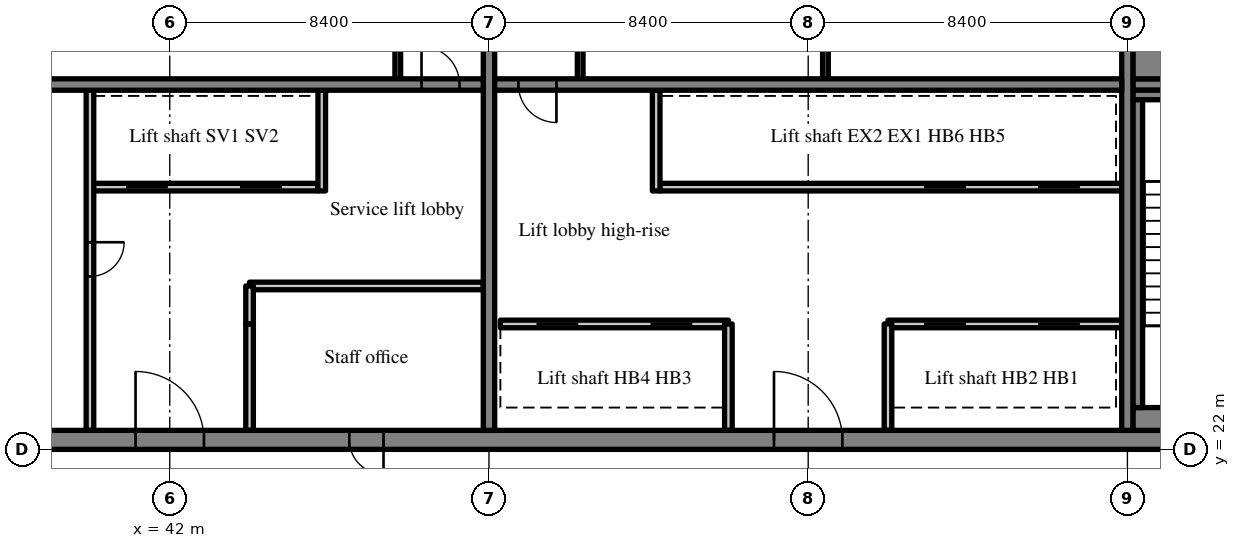
"""IFC4 building model, lengths in metres.
Left out: names, types, materials, properties, quantities, classifications, styles, units other than length and angle.
Written with IfcOpenShell. Run it as: python <this file> out.ifc"""

import sys

from ifc_helpers import new_model, si_unit, direction, frame, frame_2d, origin, place, context, subcontext, project, spatial, rectangle, extrude, source, transform, mapped, element, fill, save


model = new_model("IFC4")
c1 = context("Model", 3, precision=1e-05, world=origin(), true_north=direction((0.0, 1.0)))
c2 = subcontext(c1, "Body", "Model", "MODEL_VIEW")
j1 = project(units=[si_unit("LENGTHUNIT", "METRE"), si_unit("PLANEANGLEUNIT", "RADIAN")], contexts=[c1])
p1 = place(None, origin())
s1 = spatial("IfcSite", under=j1, at=p1, CompositionType="ELEMENT")
p2 = place(p1, origin())
s2 = spatial("IfcBuilding", under=s1, at=p2, CompositionType="ELEMENT")
p3 = place(p2, frame((0.0, 0.0, 281.7)))
s3 = spatial("IfcBuildingStorey", under=s2, at=p3, CompositionType="ELEMENT", Elevation=281.7)
m1 = source(origin(), c2, "Body", "SweptSolid", [
    extrude(rectangle(XDim=50.4, YDim=0.5, at=frame_2d((25.2, 0.0))), origin(), (0.0, 0.0, 1.0), 3.72),
])
p4 = place(p3, frame((25.2, 22.25, 0.0), z_axis=(0.0, 0.0, 1.0), x_axis=(1.0, 0.0, 0.0)))
e1 = element("IfcWall", 1, at=p4, inside=s3, PredefinedType="SHEAR", context=c2, shape_type="MappedRepresentation", body=[
    mapped(m1, transform((0.0, 0.0, 0.0), scale=1.0)),
])
m2 = source(origin(), c2, "Body", "SweptSolid", [
    extrude(rectangle(XDim=1.8, YDim=2.1, at=frame_2d((0.9, 1.05))), frame((0.0, 0.26, 0.0), z_axis=(0.0, -1.0, 0.0), x_axis=(1.0, 0.0, 0.0)), (0.0, 0.0, 1.0), 0.52),
])
p5 = place(p4, frame((15.9, 0.0, 0.0)))
e2 = element("IfcOpeningElement", 2, at=p5, cuts=e1, PredefinedType="OPENING", context=c2, shape_type="MappedRepresentation", body=[
    mapped(m2, transform((0.0, 0.0, 0.0), scale=1.0)),
])
m3 = source(origin(), c2, "Body", "SweptSolid", [
    extrude(rectangle(XDim=0.9, YDim=2.1, at=frame_2d((0.45, 1.05))), frame((0.0, 0.26, 0.0), z_axis=(0.0, -1.0, 0.0), x_axis=(1.0, 0.0, 0.0)), (0.0, 0.0, 1.0), 0.52),
])
p6 = place(p4, frame((21.525, 0.0, 0.0)))
e3 = element("IfcOpeningElement", 3, at=p6, cuts=e1, PredefinedType="OPENING", context=c2, shape_type="MappedRepresentation", body=[
    mapped(m3, transform((0.0, 0.0, 0.0), scale=1.0)),
])
p7 = place(p4, frame((32.7, 0.0, 0.0)))
e4 = element("IfcOpeningElement", 4, at=p7, cuts=e1, PredefinedType="OPENING", context=c2, shape_type="MappedRepresentation", body=[
    mapped(m2, transform((0.0, 0.0, 0.0), scale=1.0)),
])
m4 = source(origin(), c2, "Body", "SweptSolid", [
    extrude(rectangle(XDim=1.2, YDim=2.1, at=frame_2d((0.6, 1.05))), frame((0.0, 0.26, 0.0), z_axis=(0.0, -1.0, 0.0), x_axis=(1.0, 0.0, 0.0)), (0.0, 0.0, 1.0), 0.52),
])
p8 = place(p4, frame((6.5, 0.0, 0.0)))
e5 = element("IfcOpeningElement", 5, at=p8, cuts=e1, PredefinedType="OPENING", context=c2, shape_type="MappedRepresentation", body=[
    mapped(m4, transform((0.0, 0.0, 0.0), scale=1.0)),
])
p9 = place(p4, frame((47.975, 0.0, 0.0)))
e6 = element("IfcOpeningElement", 6, at=p9, cuts=e1, PredefinedType="OPENING", context=c2, shape_type="MappedRepresentation", body=[
    mapped(m4, transform((0.0, 0.0, 0.0), scale=1.0)),
])
m5 = source(origin(), c2, "Body", "SweptSolid", [
    extrude(rectangle(XDim=19.0, YDim=0.3, at=frame_2d((9.5, 0.0))), origin(), (0.0, 0.0, 1.0), 3.72),
])
p10 = place(p3, frame((50.4, 22.5, 0.0), z_axis=(0.0, 0.0, 1.0), x_axis=(0.0, 1.0, 0.0)))
e7 = element("IfcWall", 7, at=p10, inside=s3, PredefinedType="SHEAR", context=c2, shape_type="MappedRepresentation", body=[
    mapped(m5, transform((0.0, 0.0, 0.0), scale=1.0)),
])
m6 = source(origin(), c2, "Body", "SweptSolid", [
    extrude(rectangle(XDim=1.1, YDim=2.1, at=frame_2d((0.55, 1.05))), frame((0.0, 0.16, 0.0), z_axis=(0.0, -1.0, 0.0), x_axis=(1.0, 0.0, 0.0)), (0.0, 0.0, 1.0), 0.32),
])
p11 = place(p10, frame((12.95, 0.0, 0.0)))
e8 = element("IfcOpeningElement", 8, at=p11, cuts=e7, PredefinedType="OPENING", context=c2, shape_type="MappedRepresentation", body=[
    mapped(m6, transform((0.0, 0.0, 0.0), scale=1.0)),
])
p12 = place(p3, frame((67.2, 22.5, 0.0), z_axis=(0.0, 0.0, 1.0), x_axis=(0.0, 1.0, 0.0)))
e9 = element("IfcWall", 9, at=p12, inside=s3, PredefinedType="SHEAR", context=c2, shape_type="MappedRepresentation", body=[
    mapped(m5, transform((0.0, 0.0, 0.0), scale=1.0)),
])
m7 = source(origin(), c2, "Body", "SweptSolid", [
    extrude(rectangle(XDim=16.5, YDim=0.3, at=frame_2d((8.25, 0.0))), origin(), (0.0, 0.0, 1.0), 3.72),
])
p13 = place(p3, frame((33.75, 31.6, 0.0), z_axis=(0.0, 0.0, 1.0), x_axis=(1.0, 0.0, 0.0)))
e10 = element("IfcWall", 10, at=p13, inside=s3, PredefinedType="SHEAR", context=c2, shape_type="MappedRepresentation", body=[
    mapped(m7, transform((0.0, 0.0, 0.0), scale=1.0)),
])
m8 = source(origin(), c2, "Body", "SweptSolid", [
    extrude(rectangle(XDim=1.0, YDim=2.1, at=frame_2d((0.5, 1.05))), frame((0.0, 0.16, 0.0), z_axis=(0.0, -1.0, 0.0), x_axis=(1.0, 0.0, 0.0)), (0.0, 0.0, 1.0), 0.32),
])
p14 = place(p13, frame((14.875, 0.0, 0.0)))
e11 = element("IfcOpeningElement", 11, at=p14, cuts=e10, PredefinedType="OPENING", context=c2, shape_type="MappedRepresentation", body=[
    mapped(m8, transform((0.0, 0.0, 0.0), scale=1.0)),
])
p15 = place(p3, frame((50.55, 31.6, 0.0), z_axis=(0.0, 0.0, 1.0), x_axis=(1.0, 0.0, 0.0)))
e12 = element("IfcWall", 12, at=p15, inside=s3, PredefinedType="SHEAR", context=c2, shape_type="MappedRepresentation", body=[
    mapped(m7, transform((0.0, 0.0, 0.0), scale=1.0)),
])
p16 = place(p15, frame((0.625, 0.0, 0.0)))
e13 = element("IfcOpeningElement", 13, at=p16, cuts=e12, PredefinedType="OPENING", context=c2, shape_type="MappedRepresentation", body=[
    mapped(m8, transform((0.0, 0.0, 0.0), scale=1.0)),
])
m9 = source(origin(), c2, "Body", "SweptSolid", [
    extrude(rectangle(XDim=7.75, YDim=0.3, at=frame_2d((3.875, 0.0))), origin(), (0.0, 0.0, 1.0), 3.72),
])
p17 = place(p3, frame((67.35, 31.6, 0.0), z_axis=(0.0, 0.0, 1.0), x_axis=(1.0, 0.0, 0.0)))
e14 = element("IfcWall", 14, at=p17, inside=s3, PredefinedType="SHEAR", context=c2, shape_type="MappedRepresentation", body=[
    mapped(m9, transform((0.0, 0.0, 0.0), scale=1.0)),
])
p18 = place(p17, frame((5.875, 0.0, 0.0)))
e15 = element("IfcOpeningElement", 15, at=p18, cuts=e14, PredefinedType="OPENING", context=c2, shape_type="MappedRepresentation", body=[
    mapped(m6, transform((0.0, 0.0, 0.0), scale=1.0)),
])
m10 = source(origin(), c2, "Body", "SweptSolid", [
    extrude(rectangle(XDim=6.0, YDim=0.2, at=frame_2d((3.0, 0.0))), origin(), (0.0, 0.0, 1.0), 3.72),
])
p19 = place(p3, frame((39.9, 28.9, 0.0), z_axis=(0.0, 0.0, 1.0), x_axis=(1.0, 0.0, 0.0)))
e16 = element("IfcWall", 16, at=p19, inside=s3, PredefinedType="SOLIDWALL", context=c2, shape_type="MappedRepresentation", body=[
    mapped(m10, transform((0.0, 0.0, 0.0), scale=1.0)),
])
m11 = source(origin(), c2, "Body", "SweptSolid", [
    extrude(rectangle(XDim=1.1, YDim=2.1, at=frame_2d((0.55, 1.05))), frame((0.0, 0.11, 0.0), z_axis=(0.0, -1.0, 0.0), x_axis=(1.0, 0.0, 0.0)), (0.0, 0.0, 1.0), 0.22),
])
p20 = place(p19, frame((0.95, 0.0, 0.0)))
e17 = element("IfcOpeningElement", 17, at=p20, cuts=e16, PredefinedType="OPENING", context=c2, shape_type="MappedRepresentation", body=[
    mapped(m11, transform((0.0, 0.0, 0.0), scale=1.0)),
])
p21 = place(p19, frame((3.95, 0.0, 0.0)))
e18 = element("IfcOpeningElement", 18, at=p21, cuts=e16, PredefinedType="OPENING", context=c2, shape_type="MappedRepresentation", body=[
    mapped(m11, transform((0.0, 0.0, 0.0), scale=1.0)),
])
m12 = source(origin(), c2, "Body", "SweptSolid", [
    extrude(rectangle(XDim=8.95, YDim=0.2, at=frame_2d((4.475, 0.0))), origin(), (0.0, 0.0, 1.0), 3.72),
])
p22 = place(p3, frame((39.9, 22.5, 0.0), z_axis=(0.0, 0.0, 1.0), x_axis=(0.0, 1.0, 0.0)))
e19 = element("IfcWall", 19, at=p22, inside=s3, PredefinedType="PARTITIONING", context=c2, shape_type="MappedRepresentation", body=[
    mapped(m12, transform((0.0, 0.0, 0.0), scale=1.0)),
])
m13 = source(origin(), c2, "Body", "SweptSolid", [
    extrude(rectangle(XDim=0.9, YDim=2.1, at=frame_2d((0.45, 1.05))), frame((0.0, 0.11, 0.0), z_axis=(0.0, -1.0, 0.0), x_axis=(1.0, 0.0, 0.0)), (0.0, 0.0, 1.0), 0.22),
])
p23 = place(p22, frame((4.05, 0.0, 0.0)))
e20 = element("IfcOpeningElement", 20, at=p23, cuts=e19, PredefinedType="OPENING", context=c2, shape_type="MappedRepresentation", body=[
    mapped(m13, transform((0.0, 0.0, 0.0), scale=1.0)),
])
m14 = source(origin(), c2, "Body", "SweptSolid", [
    extrude(rectangle(XDim=2.8, YDim=0.2, at=frame_2d((1.4, 0.0))), origin(), (0.0, 0.0, 1.0), 3.72),
])
p24 = place(p3, frame((44.1, 22.5, 0.0), z_axis=(0.0, 0.0, 1.0), x_axis=(0.0, 1.0, 0.0)))
e21 = element("IfcWall", 21, at=p24, inside=s3, PredefinedType="PARTITIONING", context=c2, shape_type="MappedRepresentation", body=[
    mapped(m14, transform((0.0, 0.0, 0.0), scale=1.0)),
])
m15 = source(origin(), c2, "Body", "SweptSolid", [
    extrude(rectangle(XDim=2.65, YDim=0.2, at=frame_2d((1.325, 0.0))), origin(), (0.0, 0.0, 1.0), 3.72),
])
p25 = place(p3, frame((46.0, 28.8, 0.0), z_axis=(0.0, 0.0, 1.0), x_axis=(0.0, 1.0, 0.0)))
e22 = element("IfcWall", 22, at=p25, inside=s3, PredefinedType="SOLIDWALL", context=c2, shape_type="MappedRepresentation", body=[
    mapped(m15, transform((0.0, 0.0, 0.0), scale=1.0)),
])
m16 = source(origin(), c2, "Body", "SweptSolid", [
    extrude(rectangle(XDim=6.15, YDim=0.2, at=frame_2d((3.075, 0.0))), origin(), (0.0, 0.0, 1.0), 3.72),
])
p26 = place(p3, frame((44.1, 26.3, 0.0), z_axis=(0.0, 0.0, 1.0), x_axis=(1.0, 0.0, 0.0)))
e23 = element("IfcWall", 23, at=p26, inside=s3, PredefinedType="PARTITIONING", context=c2, shape_type="MappedRepresentation", body=[
    mapped(m16, transform((0.0, 0.0, 0.0), scale=1.0)),
])
m17 = source(origin(), c2, "Body", "SweptSolid", [
    extrude(rectangle(XDim=1.0, YDim=0.2, at=frame_2d((0.5, 0.0))), origin(), (0.0, 0.0, 1.0), 3.72),
])
p27 = place(p3, frame((44.1, 25.3, 0.0), z_axis=(0.0, 0.0, 1.0), x_axis=(0.0, 1.0, 0.0)))
e24 = element("IfcWall", 24, at=p27, inside=s3, PredefinedType="PARTITIONING", context=c2, shape_type="MappedRepresentation", body=[
    mapped(m17, transform((0.0, 0.0, 0.0), scale=1.0)),
])
m18 = source(origin(), c2, "Body", "SweptSolid", [
    extrude(rectangle(XDim=3.25, YDim=0.15, at=frame_2d((1.625, 0.0))), origin(), (0.0, 0.0, 1.0), 3.72),
])
p28 = place(p3, frame((48.0, 31.75, 0.0), z_axis=(0.0, 0.0, 1.0), x_axis=(0.0, 1.0, 0.0)))
e25 = element("IfcWall", 25, at=p28, inside=s3, PredefinedType="PARTITIONING", context=c2, shape_type="MappedRepresentation", body=[
    mapped(m18, transform((0.0, 0.0, 0.0), scale=1.0)),
])
m19 = source(origin(), c2, "Body", "SweptSolid", [
    extrude(rectangle(XDim=6.15, YDim=0.2, at=frame_2d((3.075, 0.0))), origin(), (0.0, 0.0, 1.0), 3.72),
])
p29 = place(p3, frame((67.05, 25.3, 0.0), z_axis=(0.0, 0.0, 1.0), x_axis=(-1.0, 0.0, 0.0)))
e26 = element("IfcWall", 26, at=p29, inside=s3, PredefinedType="SOLIDWALL", context=c2, shape_type="MappedRepresentation", body=[
    mapped(m19, transform((0.0, 0.0, 0.0), scale=1.0)),
])
p30 = place(p29, frame((1.1, 0.0, 0.0)))
e27 = element("IfcOpeningElement", 27, at=p30, cuts=e26, PredefinedType="OPENING", context=c2, shape_type="MappedRepresentation", body=[
    mapped(m11, transform((0.0, 0.0, 0.0), scale=1.0)),
])
p31 = place(p29, frame((4.1, 0.0, 0.0)))
e28 = element("IfcOpeningElement", 28, at=p31, cuts=e26, PredefinedType="OPENING", context=c2, shape_type="MappedRepresentation", body=[
    mapped(m11, transform((0.0, 0.0, 0.0), scale=1.0)),
])
p32 = place(p3, frame((56.7, 25.3, 0.0), z_axis=(0.0, 0.0, 1.0), x_axis=(-1.0, 0.0, 0.0)))
e29 = element("IfcWall", 29, at=p32, inside=s3, PredefinedType="SOLIDWALL", context=c2, shape_type="MappedRepresentation", body=[
    mapped(m10, transform((0.0, 0.0, 0.0), scale=1.0)),
])
p33 = place(p32, frame((0.95, 0.0, 0.0)))
e30 = element("IfcOpeningElement", 30, at=p33, cuts=e29, PredefinedType="OPENING", context=c2, shape_type="MappedRepresentation", body=[
    mapped(m11, transform((0.0, 0.0, 0.0), scale=1.0)),
])
p34 = place(p32, frame((3.95, 0.0, 0.0)))
e31 = element("IfcOpeningElement", 31, at=p34, cuts=e29, PredefinedType="OPENING", context=c2, shape_type="MappedRepresentation", body=[
    mapped(m11, transform((0.0, 0.0, 0.0), scale=1.0)),
])
m20 = source(origin(), c2, "Body", "SweptSolid", [
    extrude(rectangle(XDim=12.15, YDim=0.2, at=frame_2d((6.075, 0.0))), origin(), (0.0, 0.0, 1.0), 3.72),
])
p35 = place(p3, frame((67.05, 28.9, 0.0), z_axis=(0.0, 0.0, 1.0), x_axis=(-1.0, 0.0, 0.0)))
e32 = element("IfcWall", 32, at=p35, inside=s3, PredefinedType="SOLIDWALL", context=c2, shape_type="MappedRepresentation", body=[
    mapped(m20, transform((0.0, 0.0, 0.0), scale=1.0)),
])
p36 = place(p35, frame((1.1, 0.0, 0.0)))
e33 = element("IfcOpeningElement", 33, at=p36, cuts=e32, PredefinedType="OPENING", context=c2, shape_type="MappedRepresentation", body=[
    mapped(m11, transform((0.0, 0.0, 0.0), scale=1.0)),
])
p37 = place(p35, frame((4.1, 0.0, 0.0)))
e34 = element("IfcOpeningElement", 34, at=p37, cuts=e32, PredefinedType="OPENING", context=c2, shape_type="MappedRepresentation", body=[
    mapped(m11, transform((0.0, 0.0, 0.0), scale=1.0)),
])
for number, where, z_axis, x_axis in (
    (35, (60.9, 22.5, 0.0), (0.0, 0.0, 1.0), (0.0, 1.0, 0.0)),
    (36, (56.7, 22.5, 0.0), (0.0, 0.0, 1.0), (0.0, 1.0, 0.0)),
):
    element("IfcWall", number, at=place(p3, frame(where, z_axis=z_axis, x_axis=x_axis)), inside=s3, PredefinedType="SOLIDWALL", context=c2, shape_type="MappedRepresentation", body=[
        mapped(m14, transform((0.0, 0.0, 0.0), scale=1.0)),
    ])
p38 = place(p3, frame((54.8, 28.8, 0.0), z_axis=(0.0, 0.0, 1.0), x_axis=(0.0, 1.0, 0.0)))
e37 = element("IfcWall", 37, at=p38, inside=s3, PredefinedType="SOLIDWALL", context=c2, shape_type="MappedRepresentation", body=[
    mapped(m15, transform((0.0, 0.0, 0.0), scale=1.0)),
])
for number, where, z_axis, x_axis in (
    (38, (52.8, 31.75, 0.0), (0.0, 0.0, 1.0), (0.0, 1.0, 0.0)),
    (39, (59.254, 31.75, 0.0), (0.0, 0.0, 1.0), (0.0, 1.0, 0.0)),
):
    element("IfcWall", number, at=place(p3, frame(where, z_axis=z_axis, x_axis=x_axis)), inside=s3, PredefinedType="PARTITIONING", context=c2, shape_type="MappedRepresentation", body=[
        mapped(m18, transform((0.0, 0.0, 0.0), scale=1.0)),
    ])
m21 = source(origin(), c2, "Body", "SweptSolid", [
    extrude(rectangle(XDim=4.9, YDim=0.6, at=frame_2d((2.45, 0.0))), origin(), (0.0, 0.0, 1.0), 3.72),
])
p39 = place(p3, frame((67.35, 22.8, 0.0), z_axis=(0.0, 0.0, 1.0), x_axis=(1.0, 0.0, 0.0)))
e40 = element("IfcWall", 40, at=p39, inside=s3, PredefinedType="SOLIDWALL", context=c2, shape_type="MappedRepresentation", body=[
    mapped(m21, transform((0.0, 0.0, 0.0), scale=1.0)),
])
m22 = source(origin(), c2, "Body", "SweptSolid", [
    extrude(rectangle(XDim=4.9, YDim=0.25, at=frame_2d((2.45, 0.0))), origin(), (0.0, 0.0, 1.0), 3.72),
])
p40 = place(p3, frame((67.35, 31.325, 0.0), z_axis=(0.0, 0.0, 1.0), x_axis=(1.0, 0.0, 0.0)))
e41 = element("IfcWall", 41, at=p40, inside=s3, PredefinedType="SOLIDWALL", context=c2, shape_type="MappedRepresentation", body=[
    mapped(m22, transform((0.0, 0.0, 0.0), scale=1.0)),
])
m23 = source(origin(), c2, "Body", "SweptSolid", [
    extrude(rectangle(XDim=8.1, YDim=0.25, at=frame_2d((4.05, 0.0))), origin(), (0.0, 0.0, 1.0), 3.72),
])
p41 = place(p3, frame((67.475, 23.1, 0.0), z_axis=(0.0, 0.0, 1.0), x_axis=(0.0, 1.0, 0.0)))
e42 = element("IfcWall", 42, at=p41, inside=s3, PredefinedType="SOLIDWALL", context=c2, shape_type="MappedRepresentation", body=[
    mapped(m23, transform((0.0, 0.0, 0.0), scale=1.0)),
])
m24 = source(origin(), c2, "Body", "SweptSolid", [
    extrude(rectangle(XDim=4.9, YDim=1.05, at=frame_2d((2.45, 0.0))), origin(), (0.0, 0.0, 1.0), 3.72),
])
p42 = place(p3, frame((67.35, 32.275, 0.0), z_axis=(0.0, 0.0, 1.0), x_axis=(1.0, 0.0, 0.0)))
e43 = element("IfcWall", 43, at=p42, inside=s3, PredefinedType="SOLIDWALL", context=c2, shape_type="MappedRepresentation", body=[
    mapped(m24, transform((0.0, 0.0, 0.0), scale=1.0)),
])
m25 = source(origin(), c2, "Body", "SweptSolid", [
    extrude(rectangle(XDim=1.8, YDim=2.1, at=frame_2d((0.9, 1.05))), frame((0.0, 0.175, 0.0), z_axis=(0.0, -1.0, 0.0), x_axis=(1.0, 0.0, 0.0)), (0.0, 0.0, 1.0), 0.05),
])
p43 = place(p5, origin())
e44 = element("IfcDoor", 44, at=p43, inside=s3, OperationType="DOUBLE_DOOR_SINGLE_SWING", PredefinedType="DOOR", context=c2, shape_type="MappedRepresentation", body=[
    mapped(m25, transform((0.0, 0.0, 0.0), scale=1.0)),
])
fill(e2, e44)
m26 = source(origin(), c2, "Body", "SweptSolid", [
    extrude(rectangle(XDim=1.0, YDim=2.1, at=frame_2d((0.5, 1.05))), frame((0.0, 0.025, 0.0), z_axis=(0.0, -1.0, 0.0), x_axis=(1.0, 0.0, 0.0)), (0.0, 0.0, 1.0), 0.05),
])
p44 = place(p14, origin())
e45 = element("IfcDoor", 45, at=p44, inside=s3, OperationType="SINGLE_SWING_LEFT", PredefinedType="DOOR", context=c2, shape_type="MappedRepresentation", body=[
    mapped(m26, transform((0.0, 0.0, 0.0), scale=1.0)),
])
fill(e11, e45)
m27 = source(origin(), c2, "Body", "SweptSolid", [
    extrude(rectangle(XDim=1.1, YDim=2.1, at=frame_2d((0.55, 1.05))), frame((0.0, 0.025, 0.0), z_axis=(0.0, -1.0, 0.0), x_axis=(1.0, 0.0, 0.0)), (0.0, 0.0, 1.0), 0.05),
])
p45 = place(p20, origin())
e46 = element("IfcDoor", 46, at=p45, inside=s3, OperationType="SLIDING_TO_LEFT", PredefinedType="DOOR", context=c2, shape_type="MappedRepresentation", body=[
    mapped(m27, transform((0.0, 0.0, 0.0), scale=1.0)),
])
fill(e17, e46)
p46 = place(p21, origin())
e47 = element("IfcDoor", 47, at=p46, inside=s3, OperationType="SLIDING_TO_RIGHT", PredefinedType="DOOR", context=c2, shape_type="MappedRepresentation", body=[
    mapped(m27, transform((0.0, 0.0, 0.0), scale=1.0)),
])
fill(e18, e47)
m28 = source(origin(), c2, "Body", "SweptSolid", [
    extrude(rectangle(XDim=0.9, YDim=2.1, at=frame_2d((0.45, 1.05))), frame((0.0, 0.025, 0.0), z_axis=(0.0, -1.0, 0.0), x_axis=(1.0, 0.0, 0.0)), (0.0, 0.0, 1.0), 0.05),
])
p47 = place(p23, origin())
e48 = element("IfcDoor", 48, at=p47, inside=s3, OperationType="SINGLE_SWING_RIGHT", PredefinedType="DOOR", context=c2, shape_type="MappedRepresentation", body=[
    mapped(m28, transform((0.0, 0.0, 0.0), scale=1.0)),
])
fill(e20, e48)
m29 = source(origin(), c2, "Body", "SweptSolid", [
    extrude(rectangle(XDim=0.9, YDim=2.1, at=frame_2d((0.45, 1.05))), frame((0.0, 0.175, 0.0), z_axis=(0.0, -1.0, 0.0), x_axis=(1.0, 0.0, 0.0)), (0.0, 0.0, 1.0), 0.05),
])
p48 = place(p6, origin())
e49 = element("IfcDoor", 49, at=p48, inside=s3, OperationType="SINGLE_SWING_RIGHT", PredefinedType="DOOR", context=c2, shape_type="MappedRepresentation", body=[
    mapped(m29, transform((0.0, 0.0, 0.0), scale=1.0)),
])
fill(e3, e49)
p49 = place(p7, origin())
e50 = element("IfcDoor", 50, at=p49, inside=s3, OperationType="DOUBLE_DOOR_SINGLE_SWING", PredefinedType="DOOR", context=c2, shape_type="MappedRepresentation", body=[
    mapped(m25, transform((0.0, 0.0, 0.0), scale=1.0)),
])
fill(e4, e50)
p50 = place(p16, origin())
e51 = element("IfcDoor", 51, at=p50, inside=s3, OperationType="SINGLE_SWING_RIGHT", PredefinedType="DOOR", context=c2, shape_type="MappedRepresentation", body=[
    mapped(m26, transform((0.0, 0.0, 0.0), scale=1.0)),
])
fill(e13, e51)
p51 = place(p30, origin())
e52 = element("IfcDoor", 52, at=p51, inside=s3, OperationType="SLIDING_TO_RIGHT", PredefinedType="DOOR", context=c2, shape_type="MappedRepresentation", body=[
    mapped(m27, transform((0.0, 0.0, 0.0), scale=1.0)),
])
fill(e27, e52)
p52 = place(p31, origin())
e53 = element("IfcDoor", 53, at=p52, inside=s3, OperationType="SLIDING_TO_LEFT", PredefinedType="DOOR", context=c2, shape_type="MappedRepresentation", body=[
    mapped(m27, transform((0.0, 0.0, 0.0), scale=1.0)),
])
fill(e28, e53)
p53 = place(p33, origin())
e54 = element("IfcDoor", 54, at=p53, inside=s3, OperationType="SLIDING_TO_RIGHT", PredefinedType="DOOR", context=c2, shape_type="MappedRepresentation", body=[
    mapped(m27, transform((0.0, 0.0, 0.0), scale=1.0)),
])
fill(e30, e54)
p54 = place(p34, origin())
e55 = element("IfcDoor", 55, at=p54, inside=s3, OperationType="SLIDING_TO_LEFT", PredefinedType="DOOR", context=c2, shape_type="MappedRepresentation", body=[
    mapped(m27, transform((0.0, 0.0, 0.0), scale=1.0)),
])
fill(e31, e55)
p55 = place(p36, origin())
e56 = element("IfcDoor", 56, at=p55, inside=s3, OperationType="SLIDING_TO_RIGHT", PredefinedType="DOOR", context=c2, shape_type="MappedRepresentation", body=[
    mapped(m27, transform((0.0, 0.0, 0.0), scale=1.0)),
])
fill(e33, e56)
p56 = place(p37, origin())
e57 = element("IfcDoor", 57, at=p56, inside=s3, OperationType="SLIDING_TO_LEFT", PredefinedType="DOOR", context=c2, shape_type="MappedRepresentation", body=[
    mapped(m27, transform((0.0, 0.0, 0.0), scale=1.0)),
])
fill(e34, e57)
save(model, sys.argv[1])
